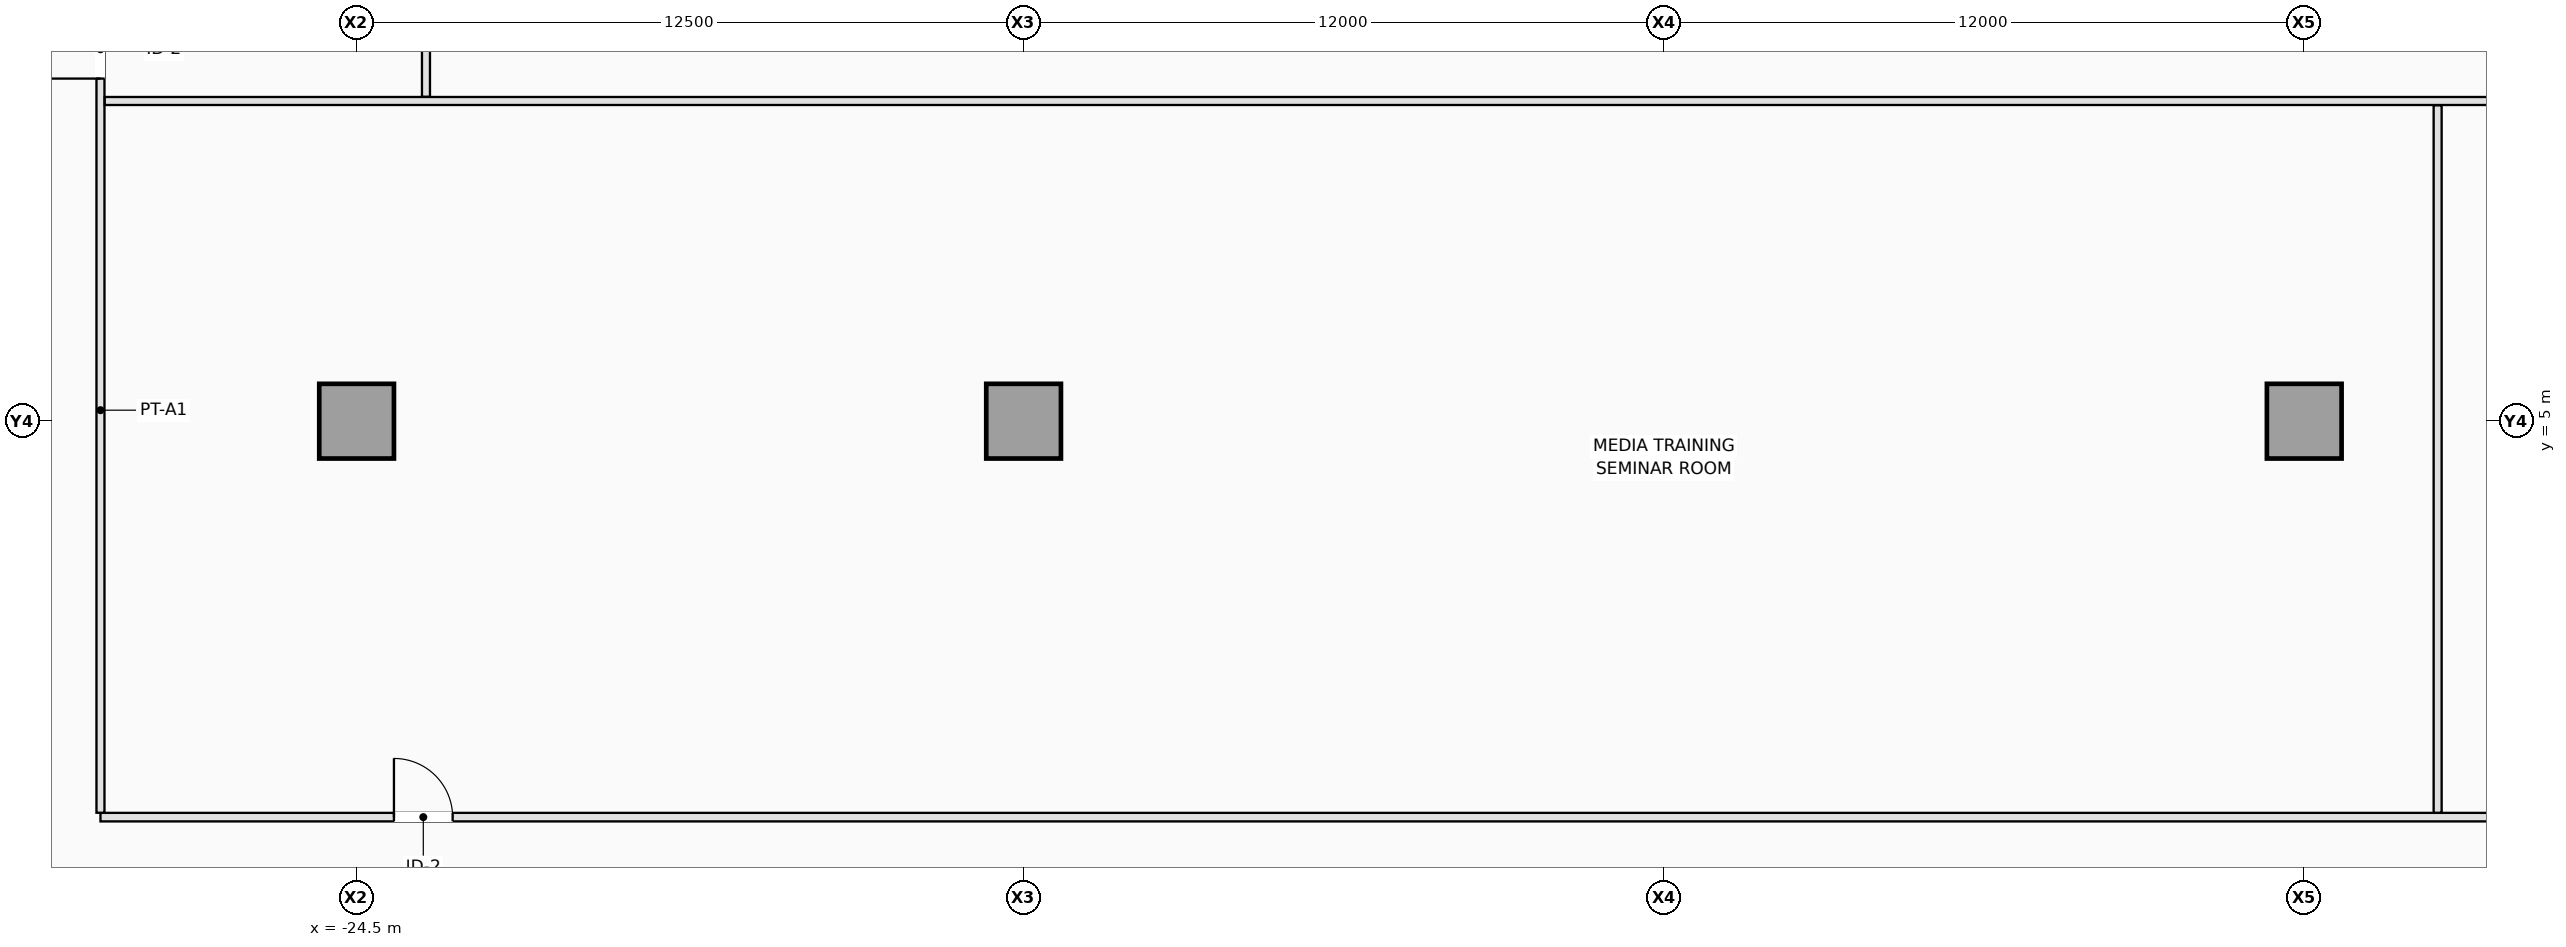
"""IFC4 building model, lengths in metres.
Left out: names, types, materials, properties, quantities, classifications, styles, units other than length and angle.
Written with IfcOpenShell. Run it as: python <this file> out.ifc"""

import sys

from ifc_helpers import new_model, si_unit, direction, frame, frame_2d, origin, origin_2d, place, context, subcontext, project, spatial, rectangle, extrude, element, fill, save


model = new_model("IFC4")
c1 = context("Model", 3, precision=1e-05, world=origin(), true_north=direction((0.0, 1.0)))
c2 = subcontext(c1, "Body", "Model", "MODEL_VIEW")
j1 = project(units=[si_unit("LENGTHUNIT", "METRE"), si_unit("PLANEANGLEUNIT", "RADIAN")], contexts=[c1])
p1 = place(None, origin())
s1 = spatial("IfcSite", under=j1, at=p1, CompositionType="ELEMENT")
p2 = place(p1, origin())
s2 = spatial("IfcBuilding", under=s1, at=p2, CompositionType="ELEMENT")
p3 = place(p2, frame((0.0, 0.0, 18.5)))
s3 = spatial("IfcBuildingStorey", under=s2, at=p3, CompositionType="ELEMENT", Elevation=18.5)
for number, where, z_axis, x_axis in (
    (1, (-24.5, 5.0, 0.0), (0.0, 0.0, 1.0), (1.0, 0.0, 0.0)),
    (2, (-12.0, 5.0, 0.0), (0.0, 0.0, 1.0), (1.0, 0.0, 0.0)),
    (3, (12.0, 5.0, 0.0), (0.0, 0.0, 1.0), (1.0, 0.0, 0.0)),
):
    element("IfcColumn", number, at=place(p3, frame(where, z_axis=z_axis, x_axis=x_axis)), inside=s3, PredefinedType="COLUMN", context=c2, shape_type="SweptSolid", body=[
        extrude(rectangle(XDim=1.4, YDim=1.4, at=origin_2d()), origin(), (0.0, 0.0, 1.0), 4.5),
    ])
p4 = place(p3, frame((-29.3, -2.42, 0.0), z_axis=(0.0, 0.0, 1.0), x_axis=(1.0, 0.0, 0.0)))
e4 = element("IfcWall", 4, at=p4, inside=s3, PredefinedType="PARTITIONING", context=c2, shape_type="SweptSolid", body=[
    extrude(rectangle(XDim=58.6, YDim=0.16, at=frame_2d((29.3, 0.0))), origin(), (0.0, 0.0, 1.0), 4.08),
])
p5 = place(p4, frame((5.5, 0.0, 0.0)))
e5 = element("IfcOpeningElement", 5, at=p5, cuts=e4, PredefinedType="OPENING", context=c2, shape_type="SweptSolid", body=[
    extrude(rectangle(XDim=1.1, YDim=2.15, at=frame_2d((0.55, 1.075))), frame((0.0, 0.09, 0.0), z_axis=(0.0, -1.0, 0.0), x_axis=(1.0, 0.0, 0.0)), (0.0, 0.0, 1.0), 0.18),
])
p6 = place(p4, frame((50.0, 0.0, 0.0)))
e6 = element("IfcOpeningElement", 6, at=p6, cuts=e4, PredefinedType="OPENING", context=c2, shape_type="SweptSolid", body=[
    extrude(rectangle(XDim=1.1, YDim=2.15, at=frame_2d((0.55, 1.075))), frame((0.0, 0.09, 0.0), z_axis=(0.0, -1.0, 0.0), x_axis=(1.0, 0.0, 0.0)), (0.0, 0.0, 1.0), 0.18),
])
p7 = place(p3, frame((-29.3, -2.338, 0.0), z_axis=(0.0, 0.0, 1.0), x_axis=(0.0, 1.0, 0.0)))
e7 = element("IfcWall", 7, at=p7, inside=s3, PredefinedType="PARTITIONING", context=c2, shape_type="SweptSolid", body=[
    extrude(rectangle(XDim=15.088, YDim=0.15, at=frame_2d((7.544, 0.0))), origin(), (0.0, 0.0, 1.0), 4.08),
])
p8 = place(p7, frame((13.758, 0.0, 0.0)))
e8 = element("IfcOpeningElement", 8, at=p8, cuts=e7, PredefinedType="OPENING", context=c2, shape_type="SweptSolid", body=[
    extrude(rectangle(XDim=1.1, YDim=2.15, at=frame_2d((0.55, 1.075))), frame((0.0, 0.085, 0.0), z_axis=(0.0, -1.0, 0.0), x_axis=(1.0, 0.0, 0.0)), (0.0, 0.0, 1.0), 0.17),
])
p9 = place(p3, frame((14.5, -2.338, 0.0), z_axis=(0.0, 0.0, 1.0), x_axis=(0.0, 1.0, 0.0)))
e9 = element("IfcWall", 9, at=p9, inside=s3, PredefinedType="PARTITIONING", context=c2, shape_type="SweptSolid", body=[
    extrude(rectangle(XDim=13.258, YDim=0.15, at=frame_2d((6.629, 0.0))), origin(), (0.0, 0.0, 1.0), 4.08),
])
p10 = place(p3, frame((-29.22, 11.0, 0.0), z_axis=(0.0, 0.0, 1.0), x_axis=(1.0, 0.0, 0.0)))
e10 = element("IfcWall", 10, at=p10, inside=s3, PredefinedType="PARTITIONING", context=c2, shape_type="SweptSolid", body=[
    extrude(rectangle(XDim=58.44, YDim=0.15, at=frame_2d((29.22, 0.0))), origin(), (0.0, 0.0, 1.0), 4.08),
])
p11 = place(p3, frame((-23.2, 11.08, 0.0), z_axis=(0.0, 0.0, 1.0), x_axis=(0.0, 1.0, 0.0)))
e11 = element("IfcWall", 11, at=p11, inside=s3, PredefinedType="PARTITIONING", context=c2, shape_type="SweptSolid", body=[
    extrude(rectangle(XDim=13.578, YDim=0.15, at=frame_2d((6.789, 0.0))), origin(), (0.0, 0.0, 1.0), 4.08),
])
p12 = place(p5, origin())
e12 = element("IfcDoor", 12, at=p12, inside=s3, OperationType="SINGLE_SWING_LEFT", PredefinedType="DOOR", context=c2, shape_type="SweptSolid", body=[
    extrude(rectangle(XDim=1.1, YDim=2.15, at=frame_2d((0.55, 1.075))), frame((0.0, 0.025, 0.0), z_axis=(0.0, -1.0, 0.0), x_axis=(1.0, 0.0, 0.0)), (0.0, 0.0, 1.0), 0.05),
])
fill(e5, e12)
p13 = place(p8, origin())
e13 = element("IfcDoor", 13, at=p13, inside=s3, OperationType="SINGLE_SWING_LEFT", PredefinedType="DOOR", context=c2, shape_type="SweptSolid", body=[
    extrude(rectangle(XDim=1.1, YDim=2.15, at=frame_2d((0.55, 1.075))), frame((0.0, 0.025, 0.0), z_axis=(0.0, -1.0, 0.0), x_axis=(1.0, 0.0, 0.0)), (0.0, 0.0, 1.0), 0.05),
])
fill(e8, e13)
save(model, sys.argv[1])
